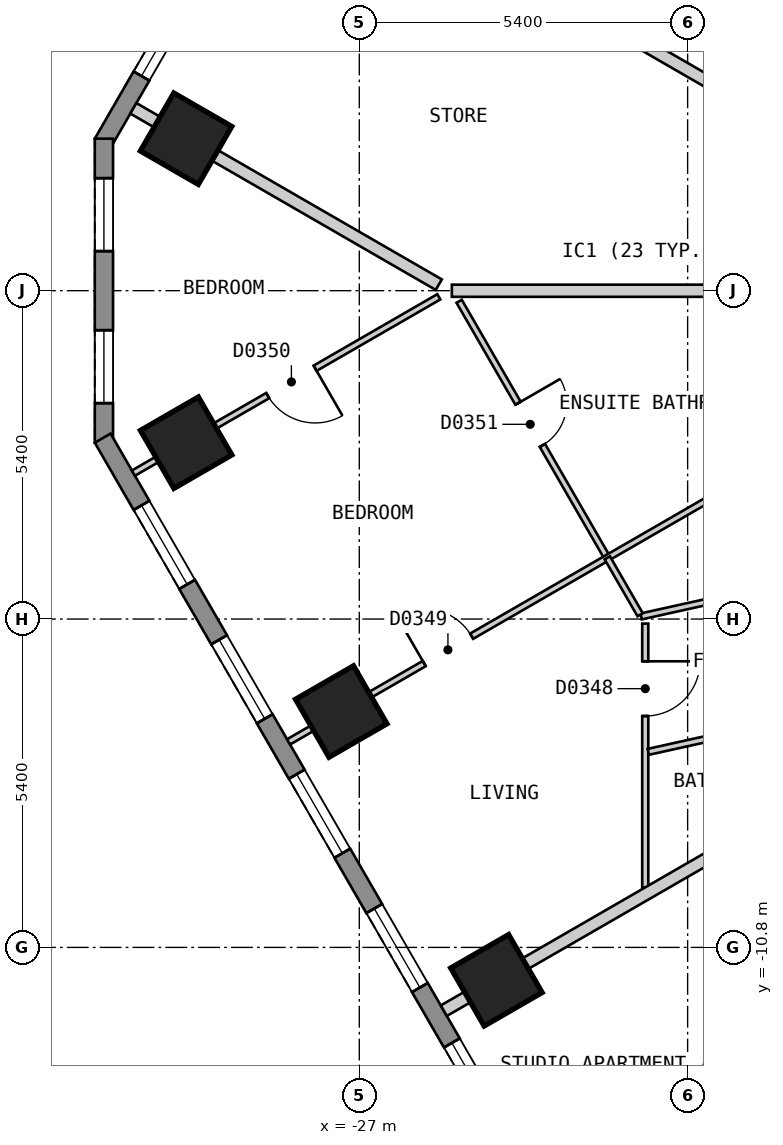
"""IFC4 building model, lengths in metres.
Left out: names, types, materials, properties, quantities, classifications, styles, units other than length and angle.
Written with IfcOpenShell. Run it as: python <this file> out.ifc"""

import sys

from ifc_helpers import new_model, si_unit, direction, frame, frame_2d, origin, origin_2d, place, context, subcontext, project, spatial, polyline, rectangle, outline, extrude, element, fill, save


model = new_model("IFC4")
c1 = context("Model", 3, precision=1e-05, world=origin(), true_north=direction((0.0, 1.0)))
c2 = subcontext(c1, "Body", "Model", "MODEL_VIEW")
j1 = project(units=[si_unit("LENGTHUNIT", "METRE"), si_unit("PLANEANGLEUNIT", "RADIAN")], contexts=[c1])
p1 = place(None, origin())
s1 = spatial("IfcSite", under=j1, at=p1, CompositionType="ELEMENT")
p2 = place(p1, origin())
s2 = spatial("IfcBuilding", under=s1, at=p2, CompositionType="ELEMENT")
p3 = place(p2, frame((0.0, 0.0, 59.4)))
s3 = spatial("IfcBuildingStorey", under=s2, at=p3, CompositionType="ELEMENT", Elevation=59.4)
for number, where, z_axis, x_axis in (
    (1, (-29.849, 2.499, 0.0), (0.0, 0.0, 1.0), (-0.5, -0.866, 0.0)),
    (2, (-29.848, -2.5, 0.0), (0.0, 0.0, 1.0), (0.5, -0.866, 0.0)),
    (3, (-27.297, -6.921, 0.0), (0.0, 0.0, 1.0), (0.5, -0.866, 0.0)),
    (4, (-24.745, -11.341, 0.0), (0.0, 0.0, 1.0), (0.5, -0.866, 0.0)),
):
    element("IfcColumn", number, at=place(p3, frame(where, z_axis=z_axis, x_axis=x_axis)), inside=s3, PredefinedType="COLUMN", context=c2, shape_type="SweptSolid", body=[
        extrude(rectangle(XDim=1.1, YDim=1.1, at=origin_2d()), origin(), (0.0, 0.0, 1.0), 3.0),
    ])
p4 = place(p3, frame((-17.71, 25.825, 0.0), z_axis=(0.0, 0.0, 1.0), x_axis=(-0.500001938803, -0.866024284413, 0.0)))
e5 = element("IfcWall", 5, at=p4, inside=s3, PredefinedType="SOLIDWALL", context=c2, shape_type="SweptSolid", body=[
    extrude(outline(polyline([(0.0, -0.15), (27.02, -0.15), (26.94, 0.15), (0.08, 0.15), (0.0, -0.15)])), origin(), (0.0, 0.0, 1.0), 2.6),
])
p5 = place(p4, frame((1.277, 0.0, 0.15)))
e6 = element("IfcOpeningElement", 6, at=p5, cuts=e5, PredefinedType="OPENING", context=c2, shape_type="SweptSolid", body=[
    extrude(rectangle(XDim=1.5, YDim=2.1, at=frame_2d((0.75, 1.05))), frame((0.0, 0.16, 0.0), z_axis=(0.0, -1.0, 0.0), x_axis=(1.0, 0.0, 0.0)), (0.0, 0.0, 1.0), 0.32),
])
p6 = place(p4, frame((3.829, 0.0, 0.15)))
e7 = element("IfcOpeningElement", 7, at=p6, cuts=e5, PredefinedType="OPENING", context=c2, shape_type="SweptSolid", body=[
    extrude(rectangle(XDim=1.5, YDim=2.1, at=frame_2d((0.75, 1.05))), frame((0.0, 0.16, 0.0), z_axis=(0.0, -1.0, 0.0), x_axis=(1.0, 0.0, 0.0)), (0.0, 0.0, 1.0), 0.32),
])
p7 = place(p4, frame((6.382, 0.0, 0.15)))
e8 = element("IfcOpeningElement", 8, at=p7, cuts=e5, PredefinedType="OPENING", context=c2, shape_type="SweptSolid", body=[
    extrude(rectangle(XDim=1.5, YDim=2.1, at=frame_2d((0.75, 1.05))), frame((0.0, 0.16, 0.0), z_axis=(0.0, -1.0, 0.0), x_axis=(1.0, 0.0, 0.0)), (0.0, 0.0, 1.0), 0.32),
])
p8 = place(p4, frame((8.933, 0.0, 0.15)))
e9 = element("IfcOpeningElement", 9, at=p8, cuts=e5, PredefinedType="OPENING", context=c2, shape_type="SweptSolid", body=[
    extrude(rectangle(XDim=1.5, YDim=2.1, at=frame_2d((0.75, 1.05))), frame((0.0, 0.16, 0.0), z_axis=(0.0, -1.0, 0.0), x_axis=(1.0, 0.0, 0.0)), (0.0, 0.0, 1.0), 0.32),
])
p9 = place(p4, frame((11.485, 0.0, 0.15)))
e10 = element("IfcOpeningElement", 10, at=p9, cuts=e5, PredefinedType="OPENING", context=c2, shape_type="SweptSolid", body=[
    extrude(rectangle(XDim=1.5, YDim=2.1, at=frame_2d((0.75, 1.05))), frame((0.0, 0.16, 0.0), z_axis=(0.0, -1.0, 0.0), x_axis=(1.0, 0.0, 0.0)), (0.0, 0.0, 1.0), 0.32),
])
p10 = place(p4, frame((14.037, 0.0, 0.15)))
e11 = element("IfcOpeningElement", 11, at=p10, cuts=e5, PredefinedType="OPENING", context=c2, shape_type="SweptSolid", body=[
    extrude(rectangle(XDim=1.5, YDim=2.1, at=frame_2d((0.75, 1.05))), frame((0.0, 0.16, 0.0), z_axis=(0.0, -1.0, 0.0), x_axis=(1.0, 0.0, 0.0)), (0.0, 0.0, 1.0), 0.32),
])
p11 = place(p4, frame((16.589, 0.0, 0.15)))
e12 = element("IfcOpeningElement", 12, at=p11, cuts=e5, PredefinedType="OPENING", context=c2, shape_type="SweptSolid", body=[
    extrude(rectangle(XDim=1.5, YDim=2.1, at=frame_2d((0.75, 1.05))), frame((0.0, 0.16, 0.0), z_axis=(0.0, -1.0, 0.0), x_axis=(1.0, 0.0, 0.0)), (0.0, 0.0, 1.0), 0.32),
])
p12 = place(p4, frame((19.141, 0.0, 0.15)))
e13 = element("IfcOpeningElement", 13, at=p12, cuts=e5, PredefinedType="OPENING", context=c2, shape_type="SweptSolid", body=[
    extrude(rectangle(XDim=1.5, YDim=2.1, at=frame_2d((0.75, 1.05))), frame((0.0, 0.16, 0.0), z_axis=(0.0, -1.0, 0.0), x_axis=(1.0, 0.0, 0.0)), (0.0, 0.0, 1.0), 0.32),
])
p13 = place(p4, frame((21.693, 0.0, 0.15)))
e14 = element("IfcOpeningElement", 14, at=p13, cuts=e5, PredefinedType="OPENING", context=c2, shape_type="SweptSolid", body=[
    extrude(rectangle(XDim=1.5, YDim=2.1, at=frame_2d((0.75, 1.05))), frame((0.0, 0.16, 0.0), z_axis=(0.0, -1.0, 0.0), x_axis=(1.0, 0.0, 0.0)), (0.0, 0.0, 1.0), 0.32),
])
p14 = place(p4, frame((24.244, 0.0, 0.15)))
e15 = element("IfcOpeningElement", 15, at=p14, cuts=e5, PredefinedType="OPENING", context=c2, shape_type="SweptSolid", body=[
    extrude(rectangle(XDim=1.5, YDim=2.1, at=frame_2d((0.75, 1.05))), frame((0.0, 0.16, 0.0), z_axis=(0.0, -1.0, 0.0), x_axis=(1.0, 0.0, 0.0)), (0.0, 0.0, 1.0), 0.32),
])
p15 = place(p3, frame((-31.2, 2.5, 0.0), z_axis=(0.0, 0.0, 1.0), x_axis=(0.0, -1.0, 0.0)))
e16 = element("IfcWall", 16, at=p15, inside=s3, PredefinedType="SOLIDWALL", context=c2, shape_type="SweptSolid", body=[
    extrude(outline(polyline([(0.0, -0.15), (5.0, -0.15), (4.92, 0.15), (0.08, 0.15), (0.0, -0.15)])), origin(), (0.0, 0.0, 1.0), 2.6),
])
p16 = place(p15, frame((0.65, 0.0, 0.15)))
e17 = element("IfcOpeningElement", 17, at=p16, cuts=e16, PredefinedType="OPENING", context=c2, shape_type="SweptSolid", body=[
    extrude(rectangle(XDim=1.2, YDim=2.1, at=frame_2d((0.6, 1.05))), frame((0.0, 0.16, 0.0), z_axis=(0.0, -1.0, 0.0), x_axis=(1.0, 0.0, 0.0)), (0.0, 0.0, 1.0), 0.32),
])
p17 = place(p15, frame((3.15, 0.0, 0.15)))
e18 = element("IfcOpeningElement", 18, at=p17, cuts=e16, PredefinedType="OPENING", context=c2, shape_type="SweptSolid", body=[
    extrude(rectangle(XDim=1.2, YDim=2.1, at=frame_2d((0.6, 1.05))), frame((0.0, 0.16, 0.0), z_axis=(0.0, -1.0, 0.0), x_axis=(1.0, 0.0, 0.0)), (0.0, 0.0, 1.0), 0.32),
])
p18 = place(p3, frame((-31.22, -2.425, 0.0), z_axis=(0.0, 0.0, 1.0), x_axis=(0.500001938803, -0.866024284413, 0.0)))
e19 = element("IfcWall", 19, at=p18, inside=s3, PredefinedType="SOLIDWALL", context=c2, shape_type="SweptSolid", body=[
    extrude(outline(polyline([(0.0, -0.15), (27.02, -0.15), (26.94, 0.15), (0.08, 0.15), (0.0, -0.15)])), origin(), (0.0, 0.0, 1.0), 2.6),
])
p19 = place(p18, frame((1.277, 0.0, 0.15)))
e20 = element("IfcOpeningElement", 20, at=p19, cuts=e19, PredefinedType="OPENING", context=c2, shape_type="SweptSolid", body=[
    extrude(rectangle(XDim=1.5, YDim=2.1, at=frame_2d((0.75, 1.05))), frame((0.0, 0.16, 0.0), z_axis=(0.0, -1.0, 0.0), x_axis=(1.0, 0.0, 0.0)), (0.0, 0.0, 1.0), 0.32),
])
p20 = place(p18, frame((3.829, 0.0, 0.15)))
e21 = element("IfcOpeningElement", 21, at=p20, cuts=e19, PredefinedType="OPENING", context=c2, shape_type="SweptSolid", body=[
    extrude(rectangle(XDim=1.5, YDim=2.1, at=frame_2d((0.75, 1.05))), frame((0.0, 0.16, 0.0), z_axis=(0.0, -1.0, 0.0), x_axis=(1.0, 0.0, 0.0)), (0.0, 0.0, 1.0), 0.32),
])
p21 = place(p18, frame((6.382, 0.0, 0.15)))
e22 = element("IfcOpeningElement", 22, at=p21, cuts=e19, PredefinedType="OPENING", context=c2, shape_type="SweptSolid", body=[
    extrude(rectangle(XDim=1.5, YDim=2.1, at=frame_2d((0.75, 1.05))), frame((0.0, 0.16, 0.0), z_axis=(0.0, -1.0, 0.0), x_axis=(1.0, 0.0, 0.0)), (0.0, 0.0, 1.0), 0.32),
])
p22 = place(p18, frame((8.933, 0.0, 0.15)))
e23 = element("IfcOpeningElement", 23, at=p22, cuts=e19, PredefinedType="OPENING", context=c2, shape_type="SweptSolid", body=[
    extrude(rectangle(XDim=1.5, YDim=2.1, at=frame_2d((0.75, 1.05))), frame((0.0, 0.16, 0.0), z_axis=(0.0, -1.0, 0.0), x_axis=(1.0, 0.0, 0.0)), (0.0, 0.0, 1.0), 0.32),
])
p23 = place(p18, frame((11.485, 0.0, 0.15)))
e24 = element("IfcOpeningElement", 24, at=p23, cuts=e19, PredefinedType="OPENING", context=c2, shape_type="SweptSolid", body=[
    extrude(rectangle(XDim=1.5, YDim=2.1, at=frame_2d((0.75, 1.05))), frame((0.0, 0.16, 0.0), z_axis=(0.0, -1.0, 0.0), x_axis=(1.0, 0.0, 0.0)), (0.0, 0.0, 1.0), 0.32),
])
p24 = place(p18, frame((14.037, 0.0, 0.15)))
e25 = element("IfcOpeningElement", 25, at=p24, cuts=e19, PredefinedType="OPENING", context=c2, shape_type="SweptSolid", body=[
    extrude(rectangle(XDim=1.5, YDim=2.1, at=frame_2d((0.75, 1.05))), frame((0.0, 0.16, 0.0), z_axis=(0.0, -1.0, 0.0), x_axis=(1.0, 0.0, 0.0)), (0.0, 0.0, 1.0), 0.32),
])
p25 = place(p18, frame((16.589, 0.0, 0.15)))
e26 = element("IfcOpeningElement", 26, at=p25, cuts=e19, PredefinedType="OPENING", context=c2, shape_type="SweptSolid", body=[
    extrude(rectangle(XDim=1.5, YDim=2.1, at=frame_2d((0.75, 1.05))), frame((0.0, 0.16, 0.0), z_axis=(0.0, -1.0, 0.0), x_axis=(1.0, 0.0, 0.0)), (0.0, 0.0, 1.0), 0.32),
])
p26 = place(p18, frame((19.141, 0.0, 0.15)))
e27 = element("IfcOpeningElement", 27, at=p26, cuts=e19, PredefinedType="OPENING", context=c2, shape_type="SweptSolid", body=[
    extrude(rectangle(XDim=1.5, YDim=2.1, at=frame_2d((0.75, 1.05))), frame((0.0, 0.16, 0.0), z_axis=(0.0, -1.0, 0.0), x_axis=(1.0, 0.0, 0.0)), (0.0, 0.0, 1.0), 0.32),
])
p27 = place(p18, frame((21.693, 0.0, 0.15)))
e28 = element("IfcOpeningElement", 28, at=p27, cuts=e19, PredefinedType="OPENING", context=c2, shape_type="SweptSolid", body=[
    extrude(rectangle(XDim=1.5, YDim=2.1, at=frame_2d((0.75, 1.05))), frame((0.0, 0.16, 0.0), z_axis=(0.0, -1.0, 0.0), x_axis=(1.0, 0.0, 0.0)), (0.0, 0.0, 1.0), 0.32),
])
p28 = place(p18, frame((24.244, 0.0, 0.15)))
e29 = element("IfcOpeningElement", 29, at=p28, cuts=e19, PredefinedType="OPENING", context=c2, shape_type="SweptSolid", body=[
    extrude(rectangle(XDim=1.5, YDim=2.1, at=frame_2d((0.75, 1.05))), frame((0.0, 0.16, 0.0), z_axis=(0.0, -1.0, 0.0), x_axis=(1.0, 0.0, 0.0)), (0.0, 0.0, 1.0), 0.32),
])
p29 = place(p3, frame((-25.358, -0.174, 0.0), z_axis=(0.0, 0.0, 1.0), x_axis=(0.500093956194, -0.865971151354, 0.0)))
e30 = element("IfcWall", 30, at=p29, inside=s3, PredefinedType="PARTITIONING", context=c2, shape_type="SweptSolid", body=[
    extrude(rectangle(XDim=4.873, YDim=0.1, at=frame_2d((2.437, 0.0))), origin(), (0.0, 0.0, 1.0), 2.6),
])
p30 = place(p29, frame((1.937, 0.0, 0.0)))
e31 = element("IfcOpeningElement", 31, at=p30, cuts=e30, PredefinedType="OPENING", context=c2, shape_type="SweptSolid", body=[
    extrude(rectangle(XDim=0.8, YDim=2.1, at=frame_2d((0.4, 1.05))), frame((0.0, 0.06, 0.0), z_axis=(0.0, -1.0, 0.0), x_axis=(1.0, 0.0, 0.0)), (0.0, 0.0, 1.0), 0.12),
])
p31 = place(p3, frame((-22.297, -9.813, 0.0), z_axis=(0.0, 0.0, 1.0), x_axis=(0.0, 1.0, 0.0)))
e32 = element("IfcWall", 32, at=p31, inside=s3, PredefinedType="PARTITIONING", context=c2, shape_type="SweptSolid", body=[
    extrude(rectangle(XDim=4.338, YDim=0.1, at=frame_2d((2.169, 0.0))), origin(), (0.0, 0.0, 1.0), 2.6),
])
p32 = place(p31, frame((2.818, 0.0, 0.0)))
e33 = element("IfcOpeningElement", 33, at=p32, cuts=e32, PredefinedType="OPENING", context=c2, shape_type="SweptSolid", body=[
    extrude(rectangle(XDim=0.9, YDim=2.1, at=frame_2d((0.45, 1.05))), frame((0.0, 0.06, 0.0), z_axis=(0.0, -1.0, 0.0), x_axis=(1.0, 0.0, 0.0)), (0.0, 0.0, 1.0), 0.12),
])
p33 = place(p3, frame((-22.365, -5.357, 0.0), z_axis=(0.0, 0.0, 1.0), x_axis=(0.976339488582, 0.216243388421, 0.0)))
e34 = element("IfcWall", 34, at=p33, inside=s3, PredefinedType="PARTITIONING", context=c2, shape_type="SweptSolid", body=[
    extrude(rectangle(XDim=4.139, YDim=0.1, at=frame_2d((2.069, 0.0))), origin(), (0.0, 0.0, 1.0), 2.6),
])
p34 = place(p33, frame((1.672, 0.0, 0.0)))
e35 = element("IfcOpeningElement", 35, at=p34, cuts=e34, PredefinedType="OPENING", context=c2, shape_type="SweptSolid", body=[
    extrude(rectangle(XDim=0.9, YDim=2.1, at=frame_2d((0.45, 1.05))), frame((0.0, 0.06, 0.0), z_axis=(0.0, -1.0, 0.0), x_axis=(1.0, 0.0, 0.0)), (0.0, 0.0, 1.0), 0.12),
])
p35 = place(p3, frame((-22.247, -7.584, 0.0), z_axis=(0.0, 0.0, 1.0), x_axis=(0.97635375062, 0.216178985219, 0.0)))
e36 = element("IfcWall", 36, at=p35, inside=s3, PredefinedType="PARTITIONING", context=c2, shape_type="SweptSolid", body=[
    extrude(rectangle(XDim=4.094, YDim=0.1, at=frame_2d((2.047, 0.0))), origin(), (0.0, 0.0, 1.0), 2.6),
])
p36 = place(p35, frame((1.621, 0.0, 0.0)))
e37 = element("IfcOpeningElement", 37, at=p36, cuts=e36, PredefinedType="OPENING", context=c2, shape_type="SweptSolid", body=[
    extrude(rectangle(XDim=0.8, YDim=2.1, at=frame_2d((0.4, 1.05))), frame((0.0, 0.06, 0.0), z_axis=(0.0, -1.0, 0.0), x_axis=(1.0, 0.0, 0.0)), (0.0, 0.0, 1.0), 0.12),
])
p37 = place(p3, frame((-28.163, -7.42, 0.0), z_axis=(0.0, 0.0, 1.0), x_axis=(0.866065245018, 0.499930986609, 0.0)))
e38 = element("IfcWall", 38, at=p37, inside=s3, PredefinedType="PARTITIONING", context=c2, shape_type="SweptSolid", body=[
    extrude(rectangle(XDim=10.0, YDim=0.1, at=frame_2d((5.0, 0.0))), origin(), (0.0, 0.0, 1.0), 2.6),
])
p38 = place(p37, frame((2.576, 0.0, 0.0)))
e39 = element("IfcOpeningElement", 39, at=p38, cuts=e38, PredefinedType="OPENING", context=c2, shape_type="SweptSolid", body=[
    extrude(rectangle(XDim=0.9, YDim=2.1, at=frame_2d((0.45, 1.05))), frame((0.0, 0.06, 0.0), z_axis=(0.0, -1.0, 0.0), x_axis=(1.0, 0.0, 0.0)), (0.0, 0.0, 1.0), 0.12),
])
p39 = place(p3, frame((-30.715, -3.0, 0.0), z_axis=(0.0, 0.0, 1.0), x_axis=(0.866116197112, 0.49984270836, 0.0)))
e40 = element("IfcWall", 40, at=p39, inside=s3, PredefinedType="PARTITIONING", context=c2, shape_type="SweptSolid", body=[
    extrude(rectangle(XDim=5.8, YDim=0.1, at=frame_2d((2.9, 0.0))), origin(), (0.0, 0.0, 1.0), 2.6),
])
p40 = place(p39, frame((2.55, 0.0, 0.0)))
e41 = element("IfcOpeningElement", 41, at=p40, cuts=e40, PredefinedType="OPENING", context=c2, shape_type="SweptSolid", body=[
    extrude(rectangle(XDim=0.9, YDim=2.1, at=frame_2d((0.45, 1.05))), frame((0.0, 0.06, 0.0), z_axis=(0.0, -1.0, 0.0), x_axis=(1.0, 0.0, 0.0)), (0.0, 0.0, 1.0), 0.12),
])
p41 = place(p3, frame((-28.163, 7.419, 0.0), z_axis=(0.0, 0.0, 1.0), x_axis=(0.866022959057, -0.500004234368, 0.0)))
e42 = element("IfcWall", 42, at=p41, inside=s3, PredefinedType="PARTITIONING", context=c2, shape_type="SweptSolid", body=[
    extrude(rectangle(XDim=10.0, YDim=0.2, at=frame_2d((5.0, 0.0))), origin(), (0.0, 0.0, 1.0), 2.6),
])
p42 = place(p3, frame((-30.716, 2.999, 0.0), z_axis=(0.0, 0.0, 1.0), x_axis=(0.866032775405, -0.499987231761, 0.0)))
e43 = element("IfcWall", 43, at=p42, inside=s3, PredefinedType="PARTITIONING", context=c2, shape_type="SweptSolid", body=[
    extrude(rectangle(XDim=5.8, YDim=0.2, at=frame_2d((2.9, 0.0))), origin(), (0.0, 0.0, 1.0), 2.6),
])
p43 = place(p3, frame((-25.478, -0.001, 0.0), z_axis=(0.0, 0.0, 1.0), x_axis=(1.0, 0.0, 0.0)))
e44 = element("IfcWall", 44, at=p43, inside=s3, PredefinedType="PARTITIONING", context=c2, shape_type="SweptSolid", body=[
    extrude(rectangle(XDim=4.694, YDim=0.2, at=frame_2d((2.347, 0.0))), origin(), (0.0, 0.0, 1.0), 2.6),
])
p44 = place(p3, frame((-25.61, -11.841, 0.0), z_axis=(0.0, 0.0, 1.0), x_axis=(0.866019023803, 0.500011050288, 0.0)))
e45 = element("IfcWall", 45, at=p44, inside=s3, PredefinedType="PARTITIONING", context=c2, shape_type="SweptSolid", body=[
    extrude(rectangle(XDim=8.47, YDim=0.2, at=frame_2d((4.235, 0.0))), origin(), (0.0, 0.0, 1.0), 2.6),
])
p45 = place(p3, frame((-22.921, -4.394, 0.0), z_axis=(0.0, 0.0, 1.0), x_axis=(0.499565963512, -0.866275849889, 0.0)))
e46 = element("IfcWall", 46, at=p45, inside=s3, PredefinedType="PARTITIONING", context=c2, shape_type="SweptSolid", body=[
    extrude(rectangle(XDim=1.081, YDim=0.1, at=frame_2d((0.54, 0.0))), origin(), (0.0, 0.0, 1.0), 2.6),
])
p46 = place(p14, origin())
e47 = element("IfcWindow", 47, at=p46, inside=s3, PartitioningType="SINGLE_PANEL", PredefinedType="WINDOW", context=c2, shape_type="SweptSolid", body=[
    extrude(rectangle(XDim=1.5, YDim=2.1, at=frame_2d((0.75, 1.05))), frame((0.0, 0.03, 0.0), z_axis=(0.0, -1.0, 0.0), x_axis=(1.0, 0.0, 0.0)), (0.0, 0.0, 1.0), 0.06),
])
fill(e15, e47)
p47 = place(p16, origin())
e48 = element("IfcWindow", 48, at=p47, inside=s3, PartitioningType="SINGLE_PANEL", PredefinedType="WINDOW", context=c2, shape_type="SweptSolid", body=[
    extrude(rectangle(XDim=1.2, YDim=2.1, at=frame_2d((0.6, 1.05))), frame((0.0, 0.03, 0.0), z_axis=(0.0, -1.0, 0.0), x_axis=(1.0, 0.0, 0.0)), (0.0, 0.0, 1.0), 0.06),
])
fill(e17, e48)
p48 = place(p17, origin())
e49 = element("IfcWindow", 49, at=p48, inside=s3, PartitioningType="SINGLE_PANEL", PredefinedType="WINDOW", context=c2, shape_type="SweptSolid", body=[
    extrude(rectangle(XDim=1.2, YDim=2.1, at=frame_2d((0.6, 1.05))), frame((0.0, 0.03, 0.0), z_axis=(0.0, -1.0, 0.0), x_axis=(1.0, 0.0, 0.0)), (0.0, 0.0, 1.0), 0.06),
])
fill(e18, e49)
p49 = place(p19, origin())
e50 = element("IfcWindow", 50, at=p49, inside=s3, PartitioningType="SINGLE_PANEL", PredefinedType="WINDOW", context=c2, shape_type="SweptSolid", body=[
    extrude(rectangle(XDim=1.5, YDim=2.1, at=frame_2d((0.75, 1.05))), frame((0.0, 0.03, 0.0), z_axis=(0.0, -1.0, 0.0), x_axis=(1.0, 0.0, 0.0)), (0.0, 0.0, 1.0), 0.06),
])
fill(e20, e50)
p50 = place(p20, origin())
e51 = element("IfcWindow", 51, at=p50, inside=s3, PartitioningType="SINGLE_PANEL", PredefinedType="WINDOW", context=c2, shape_type="SweptSolid", body=[
    extrude(rectangle(XDim=1.5, YDim=2.1, at=frame_2d((0.75, 1.05))), frame((0.0, 0.03, 0.0), z_axis=(0.0, -1.0, 0.0), x_axis=(1.0, 0.0, 0.0)), (0.0, 0.0, 1.0), 0.06),
])
fill(e21, e51)
p51 = place(p21, origin())
e52 = element("IfcWindow", 52, at=p51, inside=s3, PartitioningType="SINGLE_PANEL", PredefinedType="WINDOW", context=c2, shape_type="SweptSolid", body=[
    extrude(rectangle(XDim=1.5, YDim=2.1, at=frame_2d((0.75, 1.05))), frame((0.0, 0.03, 0.0), z_axis=(0.0, -1.0, 0.0), x_axis=(1.0, 0.0, 0.0)), (0.0, 0.0, 1.0), 0.06),
])
fill(e22, e52)
p52 = place(p22, origin())
e53 = element("IfcWindow", 53, at=p52, inside=s3, PartitioningType="SINGLE_PANEL", PredefinedType="WINDOW", context=c2, shape_type="SweptSolid", body=[
    extrude(rectangle(XDim=1.5, YDim=2.1, at=frame_2d((0.75, 1.05))), frame((0.0, 0.03, 0.0), z_axis=(0.0, -1.0, 0.0), x_axis=(1.0, 0.0, 0.0)), (0.0, 0.0, 1.0), 0.06),
])
fill(e23, e53)
p53 = place(p23, origin())
e54 = element("IfcWindow", 54, at=p53, inside=s3, PartitioningType="SINGLE_PANEL", PredefinedType="WINDOW", context=c2, shape_type="SweptSolid", body=[
    extrude(rectangle(XDim=1.5, YDim=2.1, at=frame_2d((0.75, 1.05))), frame((0.0, 0.03, 0.0), z_axis=(0.0, -1.0, 0.0), x_axis=(1.0, 0.0, 0.0)), (0.0, 0.0, 1.0), 0.06),
])
fill(e24, e54)
p54 = place(p32, origin())
e55 = element("IfcDoor", 55, at=p54, inside=s3, OperationType="SINGLE_SWING_RIGHT", PredefinedType="DOOR", context=c2, shape_type="SweptSolid", body=[
    extrude(rectangle(XDim=0.9, YDim=2.1, at=frame_2d((0.45, 1.05))), frame((0.0, 0.025, 0.0), z_axis=(0.0, -1.0, 0.0), x_axis=(1.0, 0.0, 0.0)), (0.0, 0.0, 1.0), 0.05),
])
fill(e33, e55)
p55 = place(p38, origin())
e56 = element("IfcDoor", 56, at=p55, inside=s3, OperationType="SINGLE_SWING_LEFT", PredefinedType="DOOR", context=c2, shape_type="SweptSolid", body=[
    extrude(rectangle(XDim=0.9, YDim=2.1, at=frame_2d((0.45, 1.05))), frame((0.0, 0.025, 0.0), z_axis=(0.0, -1.0, 0.0), x_axis=(1.0, 0.0, 0.0)), (0.0, 0.0, 1.0), 0.05),
])
fill(e39, e56)
p56 = place(p40, origin())
e57 = element("IfcDoor", 57, at=p56, inside=s3, OperationType="SINGLE_SWING_RIGHT", PredefinedType="DOOR", context=c2, shape_type="SweptSolid", body=[
    extrude(rectangle(XDim=0.9, YDim=2.1, at=frame_2d((0.45, 1.05))), frame((0.0, 0.025, 0.0), z_axis=(0.0, -1.0, 0.0), x_axis=(1.0, 0.0, 0.0)), (0.0, 0.0, 1.0), 0.05),
])
fill(e41, e57)
p57 = place(p30, origin())
e58 = element("IfcDoor", 58, at=p57, inside=s3, OperationType="SINGLE_SWING_LEFT", PredefinedType="DOOR", context=c2, shape_type="SweptSolid", body=[
    extrude(rectangle(XDim=0.8, YDim=2.1, at=frame_2d((0.4, 1.05))), frame((0.0, 0.025, 0.0), z_axis=(0.0, -1.0, 0.0), x_axis=(1.0, 0.0, 0.0)), (0.0, 0.0, 1.0), 0.05),
])
fill(e31, e58)
save(model, sys.argv[1])
